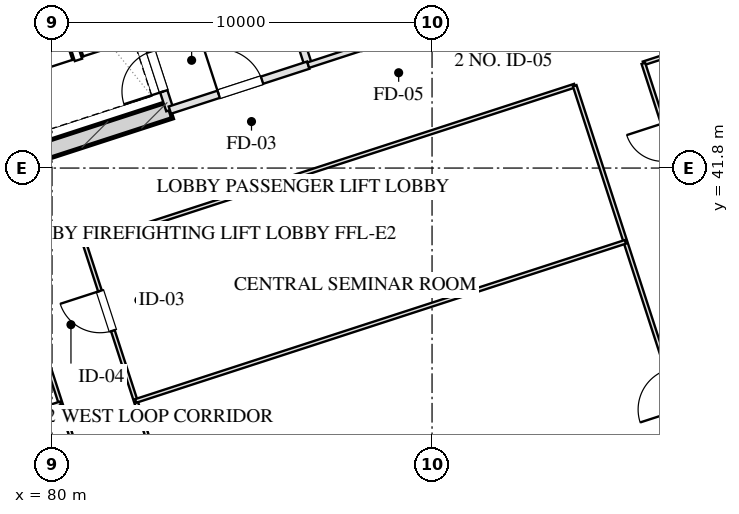
"""IFC4 building model, lengths in metres.
Left out: names, types, materials, properties, quantities, classifications, styles, units other than length and angle.
Written with IfcOpenShell. Run it as: python <this file> out.ifc"""

import sys

from ifc_helpers import new_model, si_unit, direction, frame, frame_2d, origin, place, context, subcontext, project, spatial, rectangle, extrude, element, fill, save


model = new_model("IFC4")
c1 = context("Model", 3, precision=1e-05, world=origin(), true_north=direction((0.0, 1.0)))
c2 = subcontext(c1, "Body", "Model", "MODEL_VIEW")
j1 = project(units=[si_unit("LENGTHUNIT", "METRE"), si_unit("PLANEANGLEUNIT", "RADIAN")], contexts=[c1])
p1 = place(None, origin())
s1 = spatial("IfcSite", under=j1, at=p1, CompositionType="ELEMENT")
p2 = place(p1, origin())
s2 = spatial("IfcBuilding", under=s1, at=p2, CompositionType="ELEMENT")
p3 = place(p2, frame((0.0, 0.0, 212.75)))
s3 = spatial("IfcBuildingStorey", under=s2, at=p3, CompositionType="ELEMENT", Elevation=212.75)
p4 = place(p3, frame((79.159, 42.043, 0.0), z_axis=(0.0, 0.0, 1.0), x_axis=(0.951047485828, 0.309044785913, 0.0)))
e1 = element("IfcWall", 1, at=p4, inside=s3, PredefinedType="SHEAR", context=c2, shape_type="SweptSolid", body=[
    extrude(rectangle(XDim=4.145, YDim=0.45, at=frame_2d((2.073, 0.0))), origin(), (0.0, 0.0, 1.0), 3.45),
])
p5 = place(p3, frame((82.618, 11.414, 0.0), z_axis=(0.0, 0.0, 1.0), x_axis=(-0.309016491071, 0.951056679828, 0.0)))
e2 = element("IfcWall", 2, at=p5, inside=s3, PredefinedType="SOLIDWALL", context=c2, shape_type="SweptSolid", body=[
    extrude(rectangle(XDim=38.4, YDim=0.4, at=frame_2d((19.2, 0.0))), origin(), (0.0, 0.0, 1.0), 2.55),
])
p6 = place(p5, frame((11.75, 0.0, 0.75)))
e3 = element("IfcOpeningElement", 3, at=p6, cuts=e2, PredefinedType="OPENING", context=c2, shape_type="SweptSolid", body=[
    extrude(rectangle(XDim=2.1, YDim=1.4, at=frame_2d((1.05, 0.7))), frame((0.0, 0.21, 0.0), z_axis=(0.0, -1.0, 0.0), x_axis=(1.0, 0.0, 0.0)), (0.0, 0.0, 1.0), 0.42),
])
p7 = place(p5, frame((15.55, 0.0, 0.75)))
e4 = element("IfcOpeningElement", 4, at=p7, cuts=e2, PredefinedType="OPENING", context=c2, shape_type="SweptSolid", body=[
    extrude(rectangle(XDim=2.1, YDim=1.4, at=frame_2d((1.05, 0.7))), frame((0.0, 0.21, 0.0), z_axis=(0.0, -1.0, 0.0), x_axis=(1.0, 0.0, 0.0)), (0.0, 0.0, 1.0), 0.42),
])
p8 = place(p5, frame((20.75, 0.0, 0.75)))
e5 = element("IfcOpeningElement", 5, at=p8, cuts=e2, PredefinedType="OPENING", context=c2, shape_type="SweptSolid", body=[
    extrude(rectangle(XDim=2.1, YDim=1.4, at=frame_2d((1.05, 0.7))), frame((0.0, 0.21, 0.0), z_axis=(0.0, -1.0, 0.0), x_axis=(1.0, 0.0, 0.0)), (0.0, 0.0, 1.0), 0.42),
])
p9 = place(p5, frame((24.55, 0.0, 0.75)))
e6 = element("IfcOpeningElement", 6, at=p9, cuts=e2, PredefinedType="OPENING", context=c2, shape_type="SweptSolid", body=[
    extrude(rectangle(XDim=2.1, YDim=1.4, at=frame_2d((1.05, 0.7))), frame((0.0, 0.21, 0.0), z_axis=(0.0, -1.0, 0.0), x_axis=(1.0, 0.0, 0.0)), (0.0, 0.0, 1.0), 0.42),
])
p10 = place(p3, frame((83.101, 43.324, 0.0), z_axis=(0.0, 0.0, 1.0), x_axis=(-0.309048298632, 0.951046344356, 0.0)))
e7 = element("IfcWall", 7, at=p10, inside=s3, PredefinedType="PARTITIONING", context=c2, shape_type="SweptSolid", body=[
    extrude(rectangle(XDim=1.9, YDim=0.2, at=frame_2d((0.95, 0.0))), origin(), (0.0, 0.0, 1.0), 3.155),
])
p11 = place(p10, frame((0.52, 0.0, 0.0)))
e8 = element("IfcOpeningElement", 8, at=p11, cuts=e7, PredefinedType="OPENING", context=c2, shape_type="SweptSolid", body=[
    extrude(rectangle(XDim=1.1, YDim=2.05, at=frame_2d((0.55, 1.025))), frame((0.0, 0.11, 0.0), z_axis=(0.0, -1.0, 0.0), x_axis=(1.0, 0.0, 0.0)), (0.0, 0.0, 1.0), 0.22),
])
p12 = place(p3, frame((86.743, 44.508, 0.0), z_axis=(0.0, 0.0, 1.0), x_axis=(-0.309016001439, 0.951056838919, 0.0)))
e9 = element("IfcWall", 9, at=p12, inside=s3, PredefinedType="PARTITIONING", context=c2, shape_type="SweptSolid", body=[
    extrude(rectangle(XDim=8.43, YDim=0.2, at=frame_2d((4.215, 0.0))), origin(), (0.0, 0.0, 1.0), 3.155),
])
p13 = place(p12, frame((5.95, 0.0, 0.0)))
e10 = element("IfcOpeningElement", 10, at=p13, cuts=e9, PredefinedType="OPENING", context=c2, shape_type="SweptSolid", body=[
    extrude(rectangle(XDim=0.9, YDim=2.05, at=frame_2d((0.45, 1.025))), frame((0.0, 0.11, 0.0), z_axis=(0.0, -1.0, 0.0), x_axis=(1.0, 0.0, 0.0)), (0.0, 0.0, 1.0), 0.22),
])
p14 = place(p3, frame((83.101, 43.324, 0.0), z_axis=(0.0, 0.0, 1.0), x_axis=(0.951052804469, 0.309028417967, 0.0)))
e11 = element("IfcWall", 11, at=p14, inside=s3, PredefinedType="PARTITIONING", context=c2, shape_type="SweptSolid", body=[
    extrude(rectangle(XDim=3.83, YDim=0.2, at=frame_2d((1.915, 0.0))), origin(), (0.0, 0.0, 1.0), 3.155),
])
p15 = place(p14, frame((1.35, 0.0, 0.0)))
e12 = element("IfcOpeningElement", 12, at=p15, cuts=e11, PredefinedType="OPENING", context=c2, shape_type="SweptSolid", body=[
    extrude(rectangle(XDim=1.2, YDim=2.05, at=frame_2d((0.6, 1.025))), frame((0.0, 0.11, 0.0), z_axis=(0.0, -1.0, 0.0), x_axis=(1.0, 0.0, 0.0)), (0.0, 0.0, 1.0), 0.22),
])
p16 = place(p3, frame((86.743, 44.508, 0.0), z_axis=(0.0, 0.0, 1.0), x_axis=(0.951063829732, 0.308994485023, 0.0)))
e13 = element("IfcWall", 13, at=p16, inside=s3, PredefinedType="PARTITIONING", context=c2, shape_type="SweptSolid", body=[
    extrude(rectangle(XDim=4.4, YDim=0.15, at=frame_2d((2.2, 0.0))), origin(), (0.0, 0.0, 1.0), 3.155),
])
p17 = place(p16, frame((1.45, 0.0, 0.0)))
e14 = element("IfcOpeningElement", 14, at=p17, cuts=e13, PredefinedType="OPENING", context=c2, shape_type="SweptSolid", body=[
    extrude(rectangle(XDim=1.5, YDim=2.05, at=frame_2d((0.75, 1.025))), frame((0.0, 0.085, 0.0), z_axis=(0.0, -1.0, 0.0), x_axis=(1.0, 0.0, 0.0)), (0.0, 0.0, 1.0), 0.17),
])
p18 = place(p3, frame((80.867, 39.781, 0.0), z_axis=(0.0, 0.0, 1.0), x_axis=(0.951054192928, 0.309024144872, 0.0)))
e15 = element("IfcWall", 15, at=p18, inside=s3, PredefinedType="MOVABLE", context=c2, shape_type="SweptSolid", body=[
    extrude(rectangle(XDim=13.55, YDim=0.1, at=frame_2d((6.775, 0.0))), origin(), (0.0, 0.0, 1.0), 3.155),
])
p19 = place(p3, frame((95.561, 44.555, 0.0), z_axis=(0.0, 0.0, 1.0), x_axis=(0.951055596592, 0.309019824916, 0.0)))
e16 = element("IfcWall", 16, at=p19, inside=s3, PredefinedType="MOVABLE", context=c2, shape_type="SweptSolid", body=[
    extrude(rectangle(XDim=5.25, YDim=0.1, at=frame_2d((2.625, 0.0))), origin(), (0.0, 0.0, 1.0), 3.155),
])
p20 = place(p3, frame((84.202, 23.368, 0.0), z_axis=(0.0, 0.0, 1.0), x_axis=(-0.309022042254, 0.951054876125, 0.0)))
e17 = element("IfcWall", 17, at=p20, inside=s3, PredefinedType="MOVABLE", context=c2, shape_type="SweptSolid", body=[
    extrude(rectangle(XDim=16.64, YDim=0.1, at=frame_2d((8.32, 0.0))), origin(), (0.0, 0.0, 1.0), 3.155),
])
p21 = place(p20, frame((1.16, 0.0, 0.0)))
e18 = element("IfcOpeningElement", 18, at=p21, cuts=e17, PredefinedType="OPENING", context=c2, shape_type="SweptSolid", body=[
    extrude(rectangle(XDim=1.0, YDim=2.05, at=frame_2d((0.5, 1.025))), frame((0.0, 0.06, 0.0), z_axis=(0.0, -1.0, 0.0), x_axis=(1.0, 0.0, 0.0)), (0.0, 0.0, 1.0), 0.12),
])
p22 = place(p20, frame((4.72, 0.0, 0.0)))
e19 = element("IfcOpeningElement", 19, at=p22, cuts=e17, PredefinedType="OPENING", context=c2, shape_type="SweptSolid", body=[
    extrude(rectangle(XDim=1.05, YDim=2.05, at=frame_2d((0.525, 1.025))), frame((0.0, 0.06, 0.0), z_axis=(0.0, -1.0, 0.0), x_axis=(1.0, 0.0, 0.0)), (0.0, 0.0, 1.0), 0.12),
])
p23 = place(p20, frame((7.748, 0.0, 0.0)))
e20 = element("IfcOpeningElement", 20, at=p23, cuts=e17, PredefinedType="OPENING", context=c2, shape_type="SweptSolid", body=[
    extrude(rectangle(XDim=1.0, YDim=2.05, at=frame_2d((0.5, 1.025))), frame((0.0, 0.06, 0.0), z_axis=(0.0, -1.0, 0.0), x_axis=(1.0, 0.0, 0.0)), (0.0, 0.0, 1.0), 0.12),
])
p24 = place(p20, frame((10.623, 0.0, 0.0)))
e21 = element("IfcOpeningElement", 21, at=p24, cuts=e17, PredefinedType="OPENING", context=c2, shape_type="SweptSolid", body=[
    extrude(rectangle(XDim=1.0, YDim=2.05, at=frame_2d((0.5, 1.025))), frame((0.0, 0.06, 0.0), z_axis=(0.0, -1.0, 0.0), x_axis=(1.0, 0.0, 0.0)), (0.0, 0.0, 1.0), 0.12),
])
p25 = place(p20, frame((14.255, 0.0, 0.0)))
e22 = element("IfcOpeningElement", 22, at=p25, cuts=e17, PredefinedType="OPENING", context=c2, shape_type="SweptSolid", body=[
    extrude(rectangle(XDim=1.0, YDim=2.05, at=frame_2d((0.5, 1.025))), frame((0.0, 0.06, 0.0), z_axis=(0.0, -1.0, 0.0), x_axis=(1.0, 0.0, 0.0)), (0.0, 0.0, 1.0), 0.12),
])
p26 = place(p3, frame((86.009, 23.955, 0.0), z_axis=(0.0, 0.0, 1.0), x_axis=(-0.309022042254, 0.951054876125, 0.0)))
e23 = element("IfcWall", 23, at=p26, inside=s3, PredefinedType="MOVABLE", context=c2, shape_type="SweptSolid", body=[
    extrude(rectangle(XDim=16.64, YDim=0.1, at=frame_2d((8.32, 0.0))), origin(), (0.0, 0.0, 1.0), 3.155),
])
p27 = place(p26, frame((1.944, 0.0, 0.0)))
e24 = element("IfcOpeningElement", 24, at=p27, cuts=e23, PredefinedType="OPENING", context=c2, shape_type="SweptSolid", body=[
    extrude(rectangle(XDim=1.1, YDim=2.05, at=frame_2d((0.55, 1.025))), frame((0.0, 0.06, 0.0), z_axis=(0.0, -1.0, 0.0), x_axis=(1.0, 0.0, 0.0)), (0.0, 0.0, 1.0), 0.12),
])
p28 = place(p26, frame((14.264, 0.0, 0.0)))
e25 = element("IfcOpeningElement", 25, at=p28, cuts=e23, PredefinedType="OPENING", context=c2, shape_type="SweptSolid", body=[
    extrude(rectangle(XDim=1.1, YDim=2.05, at=frame_2d((0.55, 1.025))), frame((0.0, 0.06, 0.0), z_axis=(0.0, -1.0, 0.0), x_axis=(1.0, 0.0, 0.0)), (0.0, 0.0, 1.0), 0.12),
])
p29 = place(p3, frame((98.896, 28.142, 0.0), z_axis=(0.0, 0.0, 1.0), x_axis=(-0.30901773025, 0.951056277195, 0.0)))
e26 = element("IfcWall", 26, at=p29, inside=s3, PredefinedType="MOVABLE", context=c2, shape_type="SweptSolid", body=[
    extrude(rectangle(XDim=16.64, YDim=0.1, at=frame_2d((8.32, 0.0))), origin(), (0.0, 0.0, 1.0), 3.155),
])
p30 = place(p29, frame((7.68, 0.0, 0.0)))
e27 = element("IfcOpeningElement", 27, at=p30, cuts=e26, PredefinedType="OPENING", context=c2, shape_type="SweptSolid", body=[
    extrude(rectangle(XDim=1.1, YDim=2.05, at=frame_2d((0.55, 1.025))), frame((0.0, 0.06, 0.0), z_axis=(0.0, -1.0, 0.0), x_axis=(1.0, 0.0, 0.0)), (0.0, 0.0, 1.0), 0.12),
])
p31 = place(p3, frame((100.703, 28.729, 0.0), z_axis=(0.0, 0.0, 1.0), x_axis=(-0.30901773025, 0.951056277195, 0.0)))
e28 = element("IfcWall", 28, at=p31, inside=s3, PredefinedType="MOVABLE", context=c2, shape_type="SweptSolid", body=[
    extrude(rectangle(XDim=16.64, YDim=0.1, at=frame_2d((8.32, 0.0))), origin(), (0.0, 0.0, 1.0), 3.155),
])
p32 = place(p31, frame((3.06, 0.0, 0.0)))
e29 = element("IfcOpeningElement", 29, at=p32, cuts=e28, PredefinedType="OPENING", context=c2, shape_type="SweptSolid", body=[
    extrude(rectangle(XDim=1.05, YDim=2.05, at=frame_2d((0.525, 1.025))), frame((0.0, 0.06, 0.0), z_axis=(0.0, -1.0, 0.0), x_axis=(1.0, 0.0, 0.0)), (0.0, 0.0, 1.0), 0.12),
])
p33 = place(p31, frame((9.22, 0.0, 0.0)))
e30 = element("IfcOpeningElement", 30, at=p33, cuts=e28, PredefinedType="OPENING", context=c2, shape_type="SweptSolid", body=[
    extrude(rectangle(XDim=1.0, YDim=2.05, at=frame_2d((0.5, 1.025))), frame((0.0, 0.06, 0.0), z_axis=(0.0, -1.0, 0.0), x_axis=(1.0, 0.0, 0.0)), (0.0, 0.0, 1.0), 0.12),
])
p34 = place(p31, frame((13.98, 0.0, 0.0)))
e31 = element("IfcOpeningElement", 31, at=p34, cuts=e28, PredefinedType="OPENING", context=c2, shape_type="SweptSolid", body=[
    extrude(rectangle(XDim=1.0, YDim=2.05, at=frame_2d((0.5, 1.025))), frame((0.0, 0.06, 0.0), z_axis=(0.0, -1.0, 0.0), x_axis=(1.0, 0.0, 0.0)), (0.0, 0.0, 1.0), 0.12),
])
p35 = place(p3, frame((82.202, 35.672, 0.0), z_axis=(0.0, 0.0, 1.0), x_axis=(0.951059488241, 0.309007847517, 0.0)))
e32 = element("IfcWall", 32, at=p35, inside=s3, PredefinedType="MOVABLE", context=c2, shape_type="SweptSolid", body=[
    extrude(rectangle(XDim=13.55, YDim=0.1, at=frame_2d((6.775, 0.0))), origin(), (0.0, 0.0, 1.0), 3.155),
])
p36 = place(p3, frame((75.469, 34.063, 0.0), z_axis=(0.0, 0.0, 1.0), x_axis=(0.951053443117, 0.309026452484, 0.0)))
e33 = element("IfcWall", 33, at=p36, inside=s3, PredefinedType="MOVABLE", context=c2, shape_type="SweptSolid", body=[
    extrude(rectangle(XDim=5.0, YDim=0.1, at=frame_2d((2.5, 0.0))), origin(), (0.0, 0.0, 1.0), 3.155),
])
p37 = place(p11, origin())
e34 = element("IfcDoor", 34, at=p37, inside=s3, OperationType="SINGLE_SWING_LEFT", PredefinedType="DOOR", context=c2, shape_type="SweptSolid", body=[
    extrude(rectangle(XDim=1.1, YDim=2.05, at=frame_2d((0.55, 1.025))), frame((0.0, 0.025, 0.0), z_axis=(0.0, -1.0, 0.0), x_axis=(1.0, 0.0, 0.0)), (0.0, 0.0, 1.0), 0.05),
])
fill(e8, e34)
p38 = place(p15, origin())
e35 = element("IfcDoor", 35, at=p38, inside=s3, OperationType="SINGLE_SWING_LEFT", PredefinedType="DOOR", context=c2, shape_type="SweptSolid", body=[
    extrude(rectangle(XDim=1.2, YDim=2.05, at=frame_2d((0.6, 1.025))), frame((0.0, 0.025, 0.0), z_axis=(0.0, -1.0, 0.0), x_axis=(1.0, 0.0, 0.0)), (0.0, 0.0, 1.0), 0.05),
])
fill(e12, e35)
p39 = place(p28, origin())
e36 = element("IfcDoor", 36, at=p39, inside=s3, OperationType="SINGLE_SWING_RIGHT", PredefinedType="DOOR", context=c2, shape_type="SweptSolid", body=[
    extrude(rectangle(XDim=1.1, YDim=2.05, at=frame_2d((0.55, 1.025))), frame((0.0, 0.025, 0.0), z_axis=(0.0, -1.0, 0.0), x_axis=(1.0, 0.0, 0.0)), (0.0, 0.0, 1.0), 0.05),
])
fill(e25, e36)
save(model, sys.argv[1])
